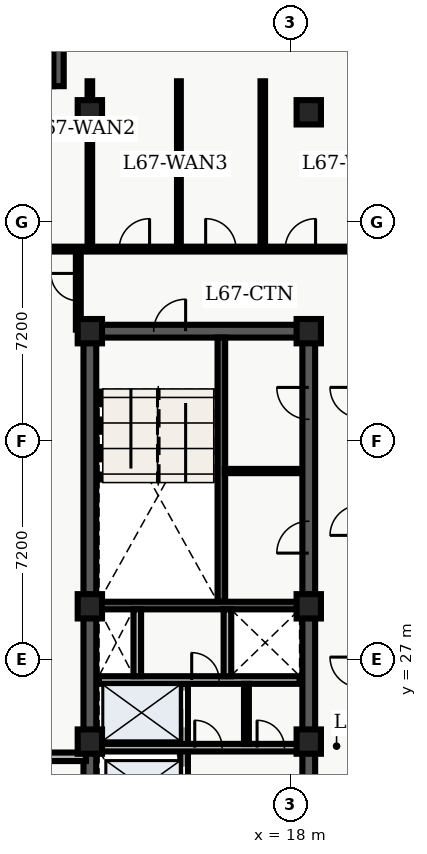
"""IFC4 building model, lengths in metres.
Left out: names, types, materials, properties, quantities, classifications, styles, units other than length and angle.
Written with IfcOpenShell. Run it as: python <this file> out.ifc"""

import sys

from ifc_helpers import new_model, entity, si_unit, converted_unit, direction, frame, origin_with_axes, origin_2d_with_axis, place, context, subcontext, project, spatial, polyline, rectangle, outline, extrude, element, fill, save


model = new_model("IFC4")
c1 = context("Model", 3, precision=1e-05, world=origin_with_axes(), true_north=direction((0.0, 1.0)))
c2 = subcontext(c1, "Body", "Model", "MODEL_VIEW")
j1 = project(units=[si_unit("LENGTHUNIT", "METRE"), converted_unit("PLANEANGLEUNIT", "DEGREE", entity("IfcPlaneAngleMeasure", 0.017), si_unit("PLANEANGLEUNIT", "RADIAN"), dimensions=[0, 0, 0, 0, 0, 0, 0])], contexts=[c1])
p1 = place(None, origin_with_axes())
s1 = spatial("IfcSite", under=j1, at=p1, CompositionType="ELEMENT")
p2 = place(p1, origin_with_axes())
s2 = spatial("IfcBuilding", under=s1, at=p2, CompositionType="ELEMENT")
p3 = place(p2, frame((0.0, 0.0, 272.4), z_axis=(0.0, 0.0, 1.0), x_axis=(1.0, 0.0, 0.0)))
s3 = spatial("IfcBuildingStorey", under=s2, at=p3, CompositionType="ELEMENT", Elevation=272.4)
p4 = place(p3, frame((11.4, 10.8, 0.0), z_axis=(0.0, 0.0, 1.0), x_axis=(0.0, 1.0, 0.0)))
e1 = element("IfcWall", 1, at=p4, inside=s3, PredefinedType="SHEAR", context=c2, shape_type="SweptSolid", body=[
    extrude(outline(polyline([(0.0, -0.21), (27.0, -0.21), (27.0, 0.21), (0.0, 0.21), (0.0, -0.21)])), origin_with_axes(), (0.0, 0.0, 1.0), 3.66),
])
p5 = place(p3, frame((11.4, 37.8, 0.0), z_axis=(0.0, 0.0, 1.0), x_axis=(1.0, 0.0, 0.0)))
e2 = element("IfcWall", 2, at=p5, inside=s3, PredefinedType="SHEAR", context=c2, shape_type="SweptSolid", body=[
    extrude(outline(polyline([(0.0, -0.21), (7.2, -0.21), (7.2, 0.21), (0.0, 0.21), (0.0, -0.21)])), origin_with_axes(), (0.0, 0.0, 1.0), 3.66),
])
p6 = place(p5, frame((2.625, 0.0, 0.0), z_axis=(0.0, 0.0, 1.0), x_axis=(1.0, 0.0, 0.0)))
e3 = element("IfcOpeningElement", 3, at=p6, cuts=e2, PredefinedType="OPENING", context=c2, shape_type="SweptSolid", body=[
    extrude(rectangle(XDim=1.05, YDim=0.44, at=origin_2d_with_axis()), origin_with_axes(), (0.0, 0.0, 1.0), 2.15),
])
p7 = place(p3, frame((18.6, 10.8, 0.0), z_axis=(0.0, 0.0, 1.0), x_axis=(0.0, 1.0, 0.0)))
e4 = element("IfcWall", 4, at=p7, inside=s3, PredefinedType="SHEAR", context=c2, shape_type="SweptSolid", body=[
    extrude(outline(polyline([(0.0, -0.21), (13.5, -0.21), (13.5, 0.21), (0.0, 0.21), (0.0, -0.21)])), origin_with_axes(), (0.0, 0.0, 1.0), 3.66),
])
p8 = place(p7, frame((1.3, 0.0, 0.0), z_axis=(0.0, 0.0, 1.0), x_axis=(1.0, 0.0, 0.0)))
e5 = element("IfcOpeningElement", 5, at=p8, cuts=e4, PredefinedType="OPENING", context=c2, shape_type="SweptSolid", body=[
    extrude(rectangle(XDim=1.1, YDim=0.44, at=origin_2d_with_axis()), origin_with_axes(), (0.0, 0.0, 1.0), 2.15),
])
p9 = place(p7, frame((3.4, 0.0, 0.0), z_axis=(0.0, 0.0, 1.0), x_axis=(1.0, 0.0, 0.0)))
e6 = element("IfcOpeningElement", 6, at=p9, cuts=e4, PredefinedType="OPENING", context=c2, shape_type="SweptSolid", body=[
    extrude(rectangle(XDim=1.1, YDim=0.44, at=origin_2d_with_axis()), origin_with_axes(), (0.0, 0.0, 1.0), 2.15),
])
p10 = place(p7, frame((11.125, 0.0, 0.0), z_axis=(0.0, 0.0, 1.0), x_axis=(1.0, 0.0, 0.0)))
e7 = element("IfcOpeningElement", 7, at=p10, cuts=e4, PredefinedType="OPENING", context=c2, shape_type="SweptSolid", body=[
    extrude(rectangle(XDim=1.05, YDim=0.44, at=origin_2d_with_axis()), origin_with_axes(), (0.0, 0.0, 1.0), 2.15),
])
p11 = place(p7, frame((6.675, 0.0, 0.0), z_axis=(0.0, 0.0, 1.0), x_axis=(1.0, 0.0, 0.0)))
e8 = element("IfcOpeningElement", 8, at=p11, cuts=e4, PredefinedType="OPENING", context=c2, shape_type="SweptSolid", body=[
    extrude(rectangle(XDim=0.95, YDim=0.44, at=origin_2d_with_axis()), origin_with_axes(), (0.0, 0.0, 1.0), 2.15),
])
p12 = place(p3, frame((18.6, 24.3, 0.0), z_axis=(0.0, 0.0, 1.0), x_axis=(0.0, 1.0, 0.0)))
e9 = element("IfcWall", 9, at=p12, inside=s3, PredefinedType="SHEAR", context=c2, shape_type="SweptSolid", body=[
    extrude(outline(polyline([(0.0, -0.21), (13.5, -0.21), (13.5, 0.21), (0.0, 0.21), (0.0, -0.21)])), origin_with_axes(), (0.0, 0.0, 1.0), 3.66),
])
p13 = place(p12, frame((6.725, 0.0, 0.0), z_axis=(0.0, 0.0, 1.0), x_axis=(1.0, 0.0, 0.0)))
e10 = element("IfcOpeningElement", 10, at=p13, cuts=e9, PredefinedType="OPENING", context=c2, shape_type="SweptSolid", body=[
    extrude(rectangle(XDim=1.05, YDim=0.44, at=origin_2d_with_axis()), origin_with_axes(), (0.0, 0.0, 1.0), 2.15),
])
p14 = place(p12, frame((11.125, 0.0, 0.0), z_axis=(0.0, 0.0, 1.0), x_axis=(1.0, 0.0, 0.0)))
e11 = element("IfcOpeningElement", 11, at=p14, cuts=e9, PredefinedType="OPENING", context=c2, shape_type="SweptSolid", body=[
    extrude(rectangle(XDim=1.05, YDim=0.44, at=origin_2d_with_axis()), origin_with_axes(), (0.0, 0.0, 1.0), 2.15),
])
p15 = place(p3, frame((15.725, 28.9, 0.0), z_axis=(0.0, 0.0, 1.0), x_axis=(0.0, 1.0, 0.0)))
e12 = element("IfcWall", 12, at=p15, inside=s3, PredefinedType="SHEAR", context=c2, shape_type="SweptSolid", body=[
    extrude(outline(polyline([(0.0, -0.125), (8.69, -0.125), (8.69, 0.125), (0.0, 0.125), (0.0, -0.125)])), origin_with_axes(), (0.0, 0.0, 1.0), 3.66),
])
p16 = place(p3, frame((11.61, 28.775, 0.0), z_axis=(0.0, 0.0, 1.0), x_axis=(1.0, 0.0, 0.0)))
e13 = element("IfcWall", 13, at=p16, inside=s3, PredefinedType="SHEAR", context=c2, shape_type="SweptSolid", body=[
    extrude(outline(polyline([(0.0, -0.125), (6.78, -0.125), (6.78, 0.125), (0.0, 0.125), (0.0, -0.125)])), origin_with_axes(), (0.0, 0.0, 1.0), 3.66),
])
p17 = place(p3, frame((14.5, 19.95, 0.0), z_axis=(0.0, 0.0, 1.0), x_axis=(0.0, 1.0, 0.0)))
e14 = element("IfcWall", 14, at=p17, inside=s3, PredefinedType="SOLIDWALL", context=c2, shape_type="SweptSolid", body=[
    extrude(outline(polyline([(0.0, -0.125), (6.25, -0.125), (6.25, 0.125), (0.0, 0.125), (0.0, -0.125)])), origin_with_axes(), (0.0, 0.0, 1.0), 2.7),
])
p18 = place(p17, frame((1.025, 0.0, 0.0), z_axis=(0.0, 0.0, 1.0), x_axis=(1.0, 0.0, 0.0)))
e15 = element("IfcOpeningElement", 15, at=p18, cuts=e14, PredefinedType="OPENING", context=c2, shape_type="SweptSolid", body=[
    extrude(rectangle(XDim=1.1, YDim=0.27, at=origin_2d_with_axis()), origin_with_axes(), (0.0, 0.0, 1.0), 2.15),
])
p19 = place(p17, frame((2.975, 0.0, 0.0), z_axis=(0.0, 0.0, 1.0), x_axis=(1.0, 0.0, 0.0)))
e16 = element("IfcOpeningElement", 16, at=p19, cuts=e14, PredefinedType="OPENING", context=c2, shape_type="SweptSolid", body=[
    extrude(rectangle(XDim=1.1, YDim=0.27, at=origin_2d_with_axis()), origin_with_axes(), (0.0, 0.0, 1.0), 2.15),
])
p20 = place(p17, frame((5.425, 0.0, 0.0), z_axis=(0.0, 0.0, 1.0), x_axis=(1.0, 0.0, 0.0)))
e17 = element("IfcOpeningElement", 17, at=p20, cuts=e14, PredefinedType="OPENING", context=c2, shape_type="SweptSolid", body=[
    extrude(rectangle(XDim=1.2, YDim=0.27, at=origin_2d_with_axis()), origin_with_axes(), (0.0, 0.0, 1.0), 2.15),
])
p21 = place(p3, frame((11.7, 24.1, 0.0), z_axis=(0.0, 0.0, 1.0), x_axis=(1.0, 0.0, 0.0)))
e18 = element("IfcWall", 18, at=p21, inside=s3, PredefinedType="SOLIDWALL", context=c2, shape_type="SweptSolid", body=[
    extrude(outline(polyline([(0.0, -0.125), (6.6, -0.125), (6.6, 0.125), (0.0, 0.125), (0.0, -0.125)])), origin_with_axes(), (0.0, 0.0, 1.0), 2.7),
])
p22 = place(p21, frame((3.6, 0.0, 0.0), z_axis=(0.0, 0.0, 1.0), x_axis=(1.0, 0.0, 0.0)))
e19 = element("IfcOpeningElement", 19, at=p22, cuts=e18, PredefinedType="OPENING", context=c2, shape_type="SweptSolid", body=[
    extrude(rectangle(XDim=0.9, YDim=0.27, at=origin_2d_with_axis()), origin_with_axes(), (0.0, 0.0, 1.0), 2.15),
])
p23 = place(p21, frame((5.65, 0.0, 0.0), z_axis=(0.0, 0.0, 1.0), x_axis=(1.0, 0.0, 0.0)))
e20 = element("IfcOpeningElement", 20, at=p23, cuts=e18, PredefinedType="OPENING", context=c2, shape_type="SweptSolid", body=[
    extrude(rectangle(XDim=0.9, YDim=0.27, at=origin_2d_with_axis()), origin_with_axes(), (0.0, 0.0, 1.0), 2.15),
])
p24 = place(p3, frame((11.7, 26.325, 0.0), z_axis=(0.0, 0.0, 1.0), x_axis=(1.0, 0.0, 0.0)))
e21 = element("IfcWall", 21, at=p24, inside=s3, PredefinedType="SOLIDWALL", context=c2, shape_type="SweptSolid", body=[
    extrude(outline(polyline([(0.0, -0.125), (6.6, -0.125), (6.6, 0.125), (0.0, 0.125), (0.0, -0.125)])), origin_with_axes(), (0.0, 0.0, 1.0), 2.7),
])
p25 = place(p24, frame((3.5, 0.0, 0.0), z_axis=(0.0, 0.0, 1.0), x_axis=(1.0, 0.0, 0.0)))
e22 = element("IfcOpeningElement", 22, at=p25, cuts=e21, PredefinedType="OPENING", context=c2, shape_type="SweptSolid", body=[
    extrude(rectangle(XDim=0.9, YDim=0.27, at=origin_2d_with_axis()), origin_with_axes(), (0.0, 0.0, 1.0), 2.15),
])
for number, where, z_axis, x_axis in (
    (23, (12.96, 26.45, 0.0), (0.0, 0.0, 1.0), (0.0, 1.0, 0.0)),
    (24, (15.925, 26.45, 0.0), (0.0, 0.0, 1.0), (0.0, 1.0, 0.0)),
):
    element("IfcWall", number, at=place(p3, frame(where, z_axis=z_axis, x_axis=x_axis)), inside=s3, PredefinedType="SOLIDWALL", context=c2, shape_type="SweptSolid", body=[
        extrude(outline(polyline([(0.0, -0.125), (2.2, -0.125), (2.2, 0.125), (0.0, 0.125), (0.0, -0.125)])), origin_with_axes(), (0.0, 0.0, 1.0), 2.7),
    ])
for number, where, z_axis, x_axis in (
    (25, (11.4, 24.3, 0.0), (0.0, 0.0, 1.0), (1.0, 0.0, 0.0)),
    (26, (11.4, 28.75, 0.0), (0.0, 0.0, 1.0), (1.0, 0.0, 0.0)),
    (27, (11.4, 37.8, 0.0), (0.0, 0.0, 1.0), (1.0, 0.0, 0.0)),
    (28, (11.4, 45.0, 0.0), (0.0, 0.0, 1.0), (1.0, 0.0, 0.0)),
    (29, (18.6, 24.3, 0.0), (0.0, 0.0, 1.0), (1.0, 0.0, 0.0)),
    (30, (18.6, 28.75, 0.0), (0.0, 0.0, 1.0), (1.0, 0.0, 0.0)),
    (31, (18.6, 37.8, 0.0), (0.0, 0.0, 1.0), (1.0, 0.0, 0.0)),
    (32, (18.6, 45.0, 0.0), (0.0, 0.0, 1.0), (1.0, 0.0, 0.0)),
):
    element("IfcColumn", number, at=place(p3, frame(where, z_axis=z_axis, x_axis=x_axis)), inside=s3, PredefinedType="COLUMN", context=c2, shape_type="SweptSolid", body=[
        extrude(rectangle(XDim=0.8, YDim=0.8, at=origin_2d_with_axis()), origin_with_axes(), (0.0, 0.0, 1.0), 3.9),
    ])
p26 = place(p3, frame((16.55, 24.22, 0.0), z_axis=(0.0, 0.0, 1.0), x_axis=(0.0, 1.0, 0.0)))
e33 = element("IfcWall", 33, at=p26, inside=s3, PredefinedType="PARTITIONING", context=c2, shape_type="SweptSolid", body=[
    extrude(outline(polyline([(0.0, -0.08), (1.98, -0.08), (1.98, 0.08), (0.0, 0.08), (0.0, -0.08)])), origin_with_axes(), (0.0, 0.0, 1.0), 2.7),
])
p27 = place(p3, frame((15.84, 33.2, 0.0), z_axis=(0.0, 0.0, 1.0), x_axis=(1.0, 0.0, 0.0)))
e34 = element("IfcWall", 34, at=p27, inside=s3, PredefinedType="PARTITIONING", context=c2, shape_type="SweptSolid", body=[
    extrude(outline(polyline([(0.0, -0.07), (2.46, -0.07), (2.46, 0.07), (0.0, 0.07), (0.0, -0.07)])), origin_with_axes(), (0.0, 0.0, 1.0), 2.7),
])
p28 = place(p3, frame((8.135, 40.5, 0.0), z_axis=(0.0, 0.0, 1.0), x_axis=(1.0, 0.0, 0.0)))
e35 = element("IfcWall", 35, at=p28, inside=s3, PredefinedType="PARTITIONING", context=c2, shape_type="SweptSolid", body=[
    extrude(outline(polyline([(0.0, -0.08), (23.93, -0.08), (23.93, 0.08), (0.0, 0.08), (0.0, -0.08)])), origin_with_axes(), (0.0, 0.0, 1.0), 2.7),
])
p29 = place(p28, frame((0.76, 0.0, 0.0), z_axis=(0.0, 0.0, 1.0), x_axis=(1.0, 0.0, 0.0)))
e36 = element("IfcOpeningElement", 36, at=p29, cuts=e35, PredefinedType="OPENING", context=c2, shape_type="SweptSolid", body=[
    extrude(rectangle(XDim=1.0, YDim=0.18, at=origin_2d_with_axis()), origin_with_axes(), (0.0, 0.0, 1.0), 2.15),
])
p30 = place(p28, frame((4.729, 0.0, 0.0), z_axis=(0.0, 0.0, 1.0), x_axis=(1.0, 0.0, 0.0)))
e37 = element("IfcOpeningElement", 37, at=p30, cuts=e35, PredefinedType="OPENING", context=c2, shape_type="SweptSolid", body=[
    extrude(rectangle(XDim=1.0, YDim=0.18, at=origin_2d_with_axis()), origin_with_axes(), (0.0, 0.0, 1.0), 2.15),
])
p31 = place(p28, frame((7.574, 0.0, 0.0), z_axis=(0.0, 0.0, 1.0), x_axis=(1.0, 0.0, 0.0)))
e38 = element("IfcOpeningElement", 38, at=p31, cuts=e35, PredefinedType="OPENING", context=c2, shape_type="SweptSolid", body=[
    extrude(rectangle(XDim=1.0, YDim=0.18, at=origin_2d_with_axis()), origin_with_axes(), (0.0, 0.0, 1.0), 2.15),
])
p32 = place(p28, frame((10.189, 0.0, 0.0), z_axis=(0.0, 0.0, 1.0), x_axis=(1.0, 0.0, 0.0)))
e39 = element("IfcOpeningElement", 39, at=p32, cuts=e35, PredefinedType="OPENING", context=c2, shape_type="SweptSolid", body=[
    extrude(rectangle(XDim=1.0, YDim=0.18, at=origin_2d_with_axis()), origin_with_axes(), (0.0, 0.0, 1.0), 2.15),
])
p33 = place(p3, frame((11.02, 37.85, 0.0), z_axis=(0.0, 0.0, 1.0), x_axis=(0.0, 1.0, 0.0)))
e40 = element("IfcWall", 40, at=p33, inside=s3, PredefinedType="PARTITIONING", context=c2, shape_type="SweptSolid", body=[
    extrude(outline(polyline([(0.0, -0.08), (2.65, -0.08), (2.65, 0.08), (0.0, 0.08), (0.0, -0.08)])), origin_with_axes(), (0.0, 0.0, 1.0), 2.7),
])
p34 = place(p33, frame((1.4, 0.0, 0.0), z_axis=(0.0, 0.0, 1.0), x_axis=(1.0, 0.0, 0.0)))
e41 = element("IfcOpeningElement", 41, at=p34, cuts=e40, PredefinedType="OPENING", context=c2, shape_type="SweptSolid", body=[
    extrude(rectangle(XDim=0.9, YDim=0.18, at=origin_2d_with_axis()), origin_with_axes(), (0.0, 0.0, 1.0), 2.15),
])
p35 = place(p3, frame((8.135, 23.8, 0.0), z_axis=(0.0, 0.0, 1.0), x_axis=(1.0, 0.0, 0.0)))
e42 = element("IfcWall", 42, at=p35, inside=s3, PredefinedType="PARTITIONING", context=c2, shape_type="SweptSolid", body=[
    extrude(outline(polyline([(0.0, -0.14), (3.135, -0.14), (3.135, 0.14), (0.0, 0.14), (0.0, -0.14)])), origin_with_axes(), (0.0, 0.0, 1.0), 2.7),
])
p36 = place(p3, frame((11.4, 40.6, 0.0), z_axis=(0.0, 0.0, 1.0), x_axis=(0.0, 1.0, 0.0)))
e43 = element("IfcWall", 43, at=p36, inside=s3, PredefinedType="PARTITIONING", context=c2, shape_type="SweptSolid", body=[
    extrude(outline(polyline([(0.0, -0.075), (5.42, -0.075), (5.42, 0.075), (0.0, 0.075), (0.0, -0.075)])), origin_with_axes(), (0.0, 0.0, 1.0), 2.7),
])
p37 = place(p3, frame((14.329, 40.6, 0.0), z_axis=(0.0, 0.0, 1.0), x_axis=(0.0, 1.0, 0.0)))
e44 = element("IfcWall", 44, at=p37, inside=s3, PredefinedType="PARTITIONING", context=c2, shape_type="SweptSolid", body=[
    extrude(outline(polyline([(0.0, -0.062), (5.42, -0.062), (5.42, 0.062), (0.0, 0.062), (0.0, -0.062)])), origin_with_axes(), (0.0, 0.0, 1.0), 2.7),
])
p38 = place(p3, frame((17.088, 40.6, 0.0), z_axis=(0.0, 0.0, 1.0), x_axis=(0.0, 1.0, 0.0)))
e45 = element("IfcWall", 45, at=p38, inside=s3, PredefinedType="PARTITIONING", context=c2, shape_type="SweptSolid", body=[
    extrude(outline(polyline([(0.0, -0.075), (5.42, -0.075), (5.42, 0.075), (0.0, 0.075), (0.0, -0.075)])), origin_with_axes(), (0.0, 0.0, 1.0), 2.7),
])
p39 = place(p3, frame((8.14, 46.03, 0.0), z_axis=(0.0, 0.0, 1.0), x_axis=(1.0, 0.0, 0.0)))
e46 = element("IfcWall", 46, at=p39, inside=s3, PredefinedType="SOLIDWALL", context=c2, shape_type="SweptSolid", body=[
    extrude(outline(polyline([(0.0, -0.17), (2.06, -0.17), (2.06, 0.17), (0.0, 0.17), (0.0, -0.17)])), origin_with_axes(), (0.0, 0.0, 1.0), 3.66),
])
p40 = place(p3, frame((10.37, 45.86, 0.0), z_axis=(0.0, 0.0, 1.0), x_axis=(0.0, 1.0, 0.0)))
e47 = element("IfcWall", 47, at=p40, inside=s3, PredefinedType="SOLIDWALL", context=c2, shape_type="SweptSolid", body=[
    extrude(outline(polyline([(0.0, -0.17), (2.74, -0.17), (2.74, 0.17), (0.0, 0.17), (0.0, -0.17)])), origin_with_axes(), (0.0, 0.0, 1.0), 3.66),
])
p41 = place(p17, frame((2.975, 0.0, 0.0), z_axis=(0.0, 0.0, 1.0), x_axis=(1.0, 0.0, 0.0)))
e48 = element("IfcDoor", 48, at=p41, inside=s3, OperationType="SLIDING_TO_RIGHT", PredefinedType="DOOR", context=c2, shape_type="SweptSolid", body=[
    extrude(rectangle(XDim=1.1, YDim=0.09, at=origin_2d_with_axis()), origin_with_axes(), (0.0, 0.0, 1.0), 2.15),
])
fill(e16, e48)
p42 = place(p17, frame((5.425, 0.0, 0.0), z_axis=(0.0, 0.0, 1.0), x_axis=(1.0, 0.0, 0.0)))
e49 = element("IfcDoor", 49, at=p42, inside=s3, OperationType="DOUBLE_DOOR_SLIDING", PredefinedType="DOOR", context=c2, shape_type="SweptSolid", body=[
    extrude(rectangle(XDim=1.2, YDim=0.09, at=origin_2d_with_axis()), origin_with_axes(), (0.0, 0.0, 1.0), 2.15),
])
fill(e17, e49)
p43 = place(p5, frame((2.625, 0.0, 0.0), z_axis=(0.0, 0.0, 1.0), x_axis=(1.0, 0.0, 0.0)))
e50 = element("IfcDoor", 50, at=p43, inside=s3, OperationType="SINGLE_SWING_RIGHT", PredefinedType="DOOR", context=c2, shape_type="SweptSolid", body=[
    extrude(rectangle(XDim=1.05, YDim=0.09, at=origin_2d_with_axis()), origin_with_axes(), (0.0, 0.0, 1.0), 2.15),
])
fill(e3, e50)
p44 = place(p21, frame((3.6, 0.0, 0.0), z_axis=(0.0, 0.0, 1.0), x_axis=(1.0, 0.0, 0.0)))
e51 = element("IfcDoor", 51, at=p44, inside=s3, OperationType="SINGLE_SWING_LEFT", PredefinedType="DOOR", context=c2, shape_type="SweptSolid", body=[
    extrude(rectangle(XDim=0.9, YDim=0.09, at=origin_2d_with_axis()), origin_with_axes(), (0.0, 0.0, 1.0), 2.15),
])
fill(e19, e51)
p45 = place(p21, frame((5.65, 0.0, 0.0), z_axis=(0.0, 0.0, 1.0), x_axis=(1.0, 0.0, 0.0)))
e52 = element("IfcDoor", 52, at=p45, inside=s3, OperationType="SINGLE_SWING_LEFT", PredefinedType="DOOR", context=c2, shape_type="SweptSolid", body=[
    extrude(rectangle(XDim=0.9, YDim=0.09, at=origin_2d_with_axis()), origin_with_axes(), (0.0, 0.0, 1.0), 2.15),
])
fill(e20, e52)
p46 = place(p24, frame((3.5, 0.0, 0.0), z_axis=(0.0, 0.0, 1.0), x_axis=(1.0, 0.0, 0.0)))
e53 = element("IfcDoor", 53, at=p46, inside=s3, OperationType="SINGLE_SWING_LEFT", PredefinedType="DOOR", context=c2, shape_type="SweptSolid", body=[
    extrude(rectangle(XDim=0.9, YDim=0.09, at=origin_2d_with_axis()), origin_with_axes(), (0.0, 0.0, 1.0), 2.15),
])
fill(e22, e53)
p47 = place(p12, frame((6.725, 0.0, 0.0), z_axis=(0.0, 0.0, 1.0), x_axis=(1.0, 0.0, 0.0)))
e54 = element("IfcDoor", 54, at=p47, inside=s3, OperationType="SINGLE_SWING_LEFT", PredefinedType="DOOR", context=c2, shape_type="SweptSolid", body=[
    extrude(rectangle(XDim=1.05, YDim=0.09, at=origin_2d_with_axis()), origin_with_axes(), (0.0, 0.0, 1.0), 2.15),
])
fill(e10, e54)
p48 = place(p12, frame((11.125, 0.0, 0.0), z_axis=(0.0, 0.0, 1.0), x_axis=(1.0, 0.0, 0.0)))
e55 = element("IfcDoor", 55, at=p48, inside=s3, OperationType="SINGLE_SWING_RIGHT", PredefinedType="DOOR", context=c2, shape_type="SweptSolid", body=[
    extrude(rectangle(XDim=1.05, YDim=0.09, at=origin_2d_with_axis()), origin_with_axes(), (0.0, 0.0, 1.0), 2.15),
])
fill(e11, e55)
p49 = place(p33, frame((1.4, 0.0, 0.0), z_axis=(0.0, 0.0, 1.0), x_axis=(1.0, 0.0, 0.0)))
e56 = element("IfcDoor", 56, at=p49, inside=s3, OperationType="SINGLE_SWING_RIGHT", PredefinedType="DOOR", context=c2, shape_type="SweptSolid", body=[
    extrude(rectangle(XDim=0.9, YDim=0.09, at=origin_2d_with_axis()), origin_with_axes(), (0.0, 0.0, 1.0), 2.15),
])
fill(e41, e56)
p50 = place(p28, frame((4.729, 0.0, 0.0), z_axis=(0.0, 0.0, 1.0), x_axis=(1.0, 0.0, 0.0)))
e57 = element("IfcDoor", 57, at=p50, inside=s3, OperationType="SINGLE_SWING_RIGHT", PredefinedType="DOOR", context=c2, shape_type="SweptSolid", body=[
    extrude(rectangle(XDim=1.0, YDim=0.09, at=origin_2d_with_axis()), origin_with_axes(), (0.0, 0.0, 1.0), 2.15),
])
fill(e37, e57)
p51 = place(p28, frame((7.574, 0.0, 0.0), z_axis=(0.0, 0.0, 1.0), x_axis=(1.0, 0.0, 0.0)))
e58 = element("IfcDoor", 58, at=p51, inside=s3, OperationType="SINGLE_SWING_LEFT", PredefinedType="DOOR", context=c2, shape_type="SweptSolid", body=[
    extrude(rectangle(XDim=1.0, YDim=0.09, at=origin_2d_with_axis()), origin_with_axes(), (0.0, 0.0, 1.0), 2.15),
])
fill(e38, e58)
p52 = place(p28, frame((10.189, 0.0, 0.0), z_axis=(0.0, 0.0, 1.0), x_axis=(1.0, 0.0, 0.0)))
e59 = element("IfcDoor", 59, at=p52, inside=s3, OperationType="SINGLE_SWING_RIGHT", PredefinedType="DOOR", context=c2, shape_type="SweptSolid", body=[
    extrude(rectangle(XDim=1.0, YDim=0.09, at=origin_2d_with_axis()), origin_with_axes(), (0.0, 0.0, 1.0), 2.15),
])
fill(e39, e59)
save(model, sys.argv[1])
